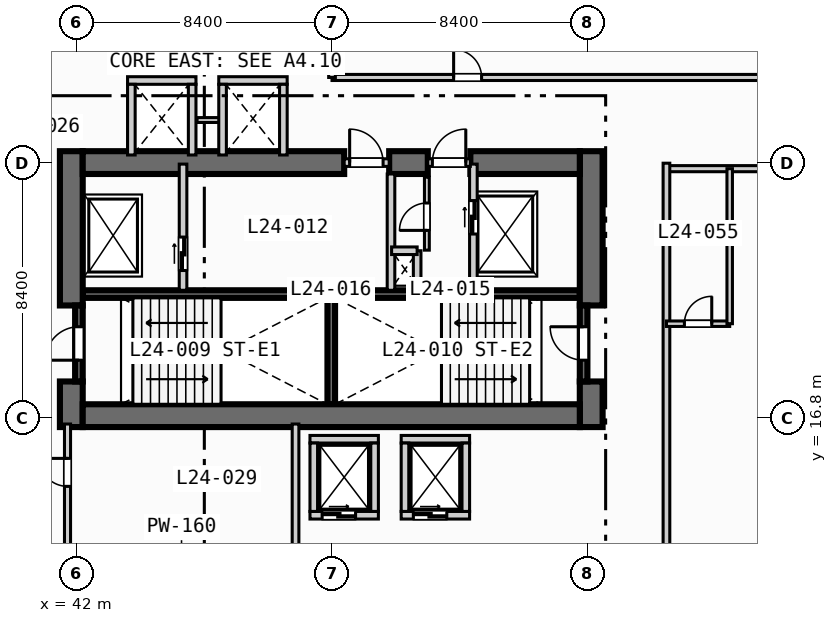
"""IFC4 building model, lengths in metres.
Left out: names, types, materials, properties, quantities, classifications, styles, units other than length and angle.
Written with IfcOpenShell. Run it as: python <this file> out.ifc"""

import sys

from ifc_helpers import new_model, si_unit, direction, frame, frame_2d, origin, place, context, subcontext, project, spatial, rectangle, extrude, element, fill, save


model = new_model("IFC4")
c1 = context("Model", 3, precision=1e-05, world=origin(), true_north=direction((0.0, 1.0)))
c2 = subcontext(c1, "Body", "Model", "MODEL_VIEW")
j1 = project(units=[si_unit("LENGTHUNIT", "METRE"), si_unit("PLANEANGLEUNIT", "RADIAN")], contexts=[c1])
p1 = place(None, origin())
s1 = spatial("IfcSite", under=j1, at=p1, CompositionType="ELEMENT")
p2 = place(p1, origin())
s2 = spatial("IfcBuilding", under=s1, at=p2, CompositionType="ELEMENT")
p3 = place(p2, frame((0.0, 0.0, 103.8)))
s3 = spatial("IfcBuildingStorey", under=s2, at=p3, CompositionType="ELEMENT", Elevation=103.8)
for number, where, z_axis, x_axis in (
    (1, (42.2, 20.875, 0.0), (0.0, 0.0, 1.0), (1.0, 0.0, 0.0)),
    (2, (50.5, 20.875, 0.0), (0.0, 0.0, 1.0), (1.0, 0.0, 0.0)),
):
    element("IfcWall", number, at=place(p3, frame(where, z_axis=z_axis, x_axis=x_axis)), inside=s3, PredefinedType="SOLIDWALL", context=c2, shape_type="SweptSolid", body=[
        extrude(rectangle(XDim=8.05, YDim=0.25, at=frame_2d((4.025, 0.0))), origin(), (0.0, 0.0, 1.0), 3.55),
    ])
p4 = place(p3, frame((50.375, 17.25, 0.0), z_axis=(0.0, 0.0, 1.0), x_axis=(0.0, 1.0, 0.0)))
e3 = element("IfcWall", 3, at=p4, inside=s3, PredefinedType="SOLIDWALL", context=c2, shape_type="SweptSolid", body=[
    extrude(rectangle(XDim=3.5, YDim=0.25, at=frame_2d((1.75, 0.0))), origin(), (0.0, 0.0, 1.0), 3.55),
])
p5 = place(p3, frame((41.825, 16.5, 0.0), z_axis=(0.0, 0.0, 1.0), x_axis=(0.0, 1.0, 0.0)))
e4 = element("IfcWall", 4, at=p5, inside=s3, PredefinedType="SHEAR", context=c2, shape_type="SweptSolid", body=[
    extrude(rectangle(XDim=1.5, YDim=0.75, at=frame_2d((0.75, 0.0))), origin(), (0.0, 0.0, 1.0), 3.55),
])
p6 = place(p3, frame((41.825, 20.5, 0.0), z_axis=(0.0, 0.0, 1.0), x_axis=(0.0, 1.0, 0.0)))
e5 = element("IfcWall", 5, at=p6, inside=s3, PredefinedType="SHEAR", context=c2, shape_type="SweptSolid", body=[
    extrude(rectangle(XDim=5.075, YDim=0.75, at=frame_2d((2.538, 0.0))), origin(), (0.0, 0.0, 1.0), 3.55),
])
p7 = place(p3, frame((58.925, 16.5, 0.0), z_axis=(0.0, 0.0, 1.0), x_axis=(0.0, 1.0, 0.0)))
e6 = element("IfcWall", 6, at=p7, inside=s3, PredefinedType="SHEAR", context=c2, shape_type="SweptSolid", body=[
    extrude(rectangle(XDim=1.5, YDim=0.75, at=frame_2d((0.75, 0.0))), origin(), (0.0, 0.0, 1.0), 3.55),
])
p8 = place(p3, frame((58.925, 20.5, 0.0), z_axis=(0.0, 0.0, 1.0), x_axis=(0.0, 1.0, 0.0)))
e7 = element("IfcWall", 7, at=p8, inside=s3, PredefinedType="SHEAR", context=c2, shape_type="SweptSolid", body=[
    extrude(rectangle(XDim=5.075, YDim=0.75, at=frame_2d((2.538, 0.0))), origin(), (0.0, 0.0, 1.0), 3.55),
])
p9 = place(p3, frame((42.2, 16.875, 0.0), z_axis=(0.0, 0.0, 1.0), x_axis=(1.0, 0.0, 0.0)))
e8 = element("IfcWall", 8, at=p9, inside=s3, PredefinedType="SHEAR", context=c2, shape_type="SweptSolid", body=[
    extrude(rectangle(XDim=16.35, YDim=0.75, at=frame_2d((8.175, 0.0))), origin(), (0.0, 0.0, 1.0), 3.55),
])
p10 = place(p3, frame((42.2, 25.2, 0.0), z_axis=(0.0, 0.0, 1.0), x_axis=(1.0, 0.0, 0.0)))
e9 = element("IfcWall", 9, at=p10, inside=s3, PredefinedType="SHEAR", context=c2, shape_type="SweptSolid", body=[
    extrude(rectangle(XDim=8.6, YDim=0.75, at=frame_2d((4.3, 0.0))), origin(), (0.0, 0.0, 1.0), 3.55),
])
p11 = place(p3, frame((52.28, 25.2, 0.0), z_axis=(0.0, 0.0, 1.0), x_axis=(1.0, 0.0, 0.0)))
e10 = element("IfcWall", 10, at=p11, inside=s3, PredefinedType="SHEAR", context=c2, shape_type="SweptSolid", body=[
    extrude(rectangle(XDim=1.27, YDim=0.75, at=frame_2d((0.635, 0.0))), origin(), (0.0, 0.0, 1.0), 3.55),
])
p12 = place(p3, frame((54.95, 25.2, 0.0), z_axis=(0.0, 0.0, 1.0), x_axis=(1.0, 0.0, 0.0)))
e11 = element("IfcWall", 11, at=p12, inside=s3, PredefinedType="SHEAR", context=c2, shape_type="SweptSolid", body=[
    extrude(rectangle(XDim=3.6, YDim=0.75, at=frame_2d((1.8, 0.0))), origin(), (0.0, 0.0, 1.0), 3.55),
])
p13 = place(p3, frame((42.075, 18.0, 0.0), z_axis=(0.0, 0.0, 1.0), x_axis=(0.0, 1.0, 0.0)))
e12 = element("IfcWall", 12, at=p13, inside=s3, PredefinedType="SOLIDWALL", context=c2, shape_type="SweptSolid", body=[
    extrude(rectangle(XDim=2.5, YDim=0.25, at=frame_2d((1.25, 0.0))), origin(), (0.0, 0.0, 1.0), 3.55),
])
p14 = place(p13, frame((0.7, 0.0, 0.0)))
e13 = element("IfcOpeningElement", 13, at=p14, cuts=e12, PredefinedType="OPENING", context=c2, shape_type="SweptSolid", body=[
    extrude(rectangle(XDim=1.1, YDim=2.15, at=frame_2d((0.55, 1.075))), frame((0.0, 0.135, 0.0), z_axis=(0.0, -1.0, 0.0), x_axis=(1.0, 0.0, 0.0)), (0.0, 0.0, 1.0), 0.27),
])
p15 = place(p3, frame((58.675, 18.0, 0.0), z_axis=(0.0, 0.0, 1.0), x_axis=(0.0, 1.0, 0.0)))
e14 = element("IfcWall", 14, at=p15, inside=s3, PredefinedType="SOLIDWALL", context=c2, shape_type="SweptSolid", body=[
    extrude(rectangle(XDim=2.5, YDim=0.25, at=frame_2d((1.25, 0.0))), origin(), (0.0, 0.0, 1.0), 3.55),
])
p16 = place(p15, frame((0.7, 0.0, 0.0)))
e15 = element("IfcOpeningElement", 15, at=p16, cuts=e14, PredefinedType="OPENING", context=c2, shape_type="SweptSolid", body=[
    extrude(rectangle(XDim=1.1, YDim=2.15, at=frame_2d((0.55, 1.075))), frame((0.0, 0.135, 0.0), z_axis=(0.0, -1.0, 0.0), x_axis=(1.0, 0.0, 0.0)), (0.0, 0.0, 1.0), 0.27),
])
p17 = place(p3, frame((45.5, 21.0, 0.0), z_axis=(0.0, 0.0, 1.0), x_axis=(0.0, 1.0, 0.0)))
e16 = element("IfcWall", 16, at=p17, inside=s3, PredefinedType="SOLIDWALL", context=c2, shape_type="SweptSolid", body=[
    extrude(rectangle(XDim=4.15, YDim=0.25, at=frame_2d((2.075, 0.0))), origin(), (0.0, 0.0, 1.0), 3.55),
])
p18 = place(p17, frame((0.65, 0.0, 0.0)))
e17 = element("IfcOpeningElement", 17, at=p18, cuts=e16, PredefinedType="OPENING", context=c2, shape_type="SweptSolid", body=[
    extrude(rectangle(XDim=1.1, YDim=2.15, at=frame_2d((0.55, 1.075))), frame((0.0, 0.135, 0.0), z_axis=(0.0, -1.0, 0.0), x_axis=(1.0, 0.0, 0.0)), (0.0, 0.0, 1.0), 0.27),
])
p19 = place(p3, frame((50.8, 25.2, 0.0), z_axis=(0.0, 0.0, 1.0), x_axis=(1.0, 0.0, 0.0)))
e18 = element("IfcWall", 18, at=p19, inside=s3, PredefinedType="SOLIDWALL", context=c2, shape_type="SweptSolid", body=[
    extrude(rectangle(XDim=1.48, YDim=0.25, at=frame_2d((0.74, 0.0))), origin(), (0.0, 0.0, 1.0), 3.55),
])
p20 = place(p19, frame((0.18, 0.0, 0.0)))
e19 = element("IfcOpeningElement", 19, at=p20, cuts=e18, PredefinedType="OPENING", context=c2, shape_type="SweptSolid", body=[
    extrude(rectangle(XDim=1.1, YDim=2.15, at=frame_2d((0.55, 1.075))), frame((0.0, 0.135, 0.0), z_axis=(0.0, -1.0, 0.0), x_axis=(1.0, 0.0, 0.0)), (0.0, 0.0, 1.0), 0.27),
])
p21 = place(p3, frame((52.34, 21.0, 0.0), z_axis=(0.0, 0.0, 1.0), x_axis=(0.0, 1.0, 0.0)))
e20 = element("IfcWall", 20, at=p21, inside=s3, PredefinedType="SOLIDWALL", context=c2, shape_type="SweptSolid", body=[
    extrude(rectangle(XDim=3.825, YDim=0.25, at=frame_2d((1.913, 0.0))), origin(), (0.0, 0.0, 1.0), 3.55),
])
p22 = place(p3, frame((55.05, 21.0, 0.0), z_axis=(0.0, 0.0, 1.0), x_axis=(0.0, 1.0, 0.0)))
e21 = element("IfcWall", 21, at=p22, inside=s3, PredefinedType="SOLIDWALL", context=c2, shape_type="SweptSolid", body=[
    extrude(rectangle(XDim=4.15, YDim=0.25, at=frame_2d((2.075, 0.0))), origin(), (0.0, 0.0, 1.0), 3.55),
])
p23 = place(p22, frame((1.85, 0.0, 0.0)))
e22 = element("IfcOpeningElement", 22, at=p23, cuts=e21, PredefinedType="OPENING", context=c2, shape_type="SweptSolid", body=[
    extrude(rectangle(XDim=1.1, YDim=2.15, at=frame_2d((0.55, 1.075))), frame((0.0, 0.135, 0.0), z_axis=(0.0, -1.0, 0.0), x_axis=(1.0, 0.0, 0.0)), (0.0, 0.0, 1.0), 0.27),
])
p24 = place(p3, frame((53.55, 25.2, 0.0), z_axis=(0.0, 0.0, 1.0), x_axis=(1.0, 0.0, 0.0)))
e23 = element("IfcWall", 23, at=p24, inside=s3, PredefinedType="SOLIDWALL", context=c2, shape_type="SweptSolid", body=[
    extrude(rectangle(XDim=1.4, YDim=0.25, at=frame_2d((0.7, 0.0))), origin(), (0.0, 0.0, 1.0), 3.55),
])
p25 = place(p24, frame((0.15, 0.0, 0.0)))
e24 = element("IfcOpeningElement", 24, at=p25, cuts=e23, PredefinedType="OPENING", context=c2, shape_type="SweptSolid", body=[
    extrude(rectangle(XDim=1.1, YDim=2.15, at=frame_2d((0.55, 1.075))), frame((0.0, 0.135, 0.0), z_axis=(0.0, -1.0, 0.0), x_axis=(1.0, 0.0, 0.0)), (0.0, 0.0, 1.0), 0.27),
])
p26 = place(p3, frame((53.2, 21.0, 0.0), z_axis=(0.0, 0.0, 1.0), x_axis=(0.0, 1.0, 0.0)))
e25 = element("IfcWall", 25, at=p26, inside=s3, PredefinedType="SOLIDWALL", context=c2, shape_type="SweptSolid", body=[
    extrude(rectangle(XDim=1.3, YDim=0.25, at=frame_2d((0.65, 0.0))), origin(), (0.0, 0.0, 1.0), 3.55),
])
p27 = place(p3, frame((52.36, 22.3, 0.0), z_axis=(0.0, 0.0, 1.0), x_axis=(1.0, 0.0, 0.0)))
e26 = element("IfcWall", 26, at=p27, inside=s3, PredefinedType="SOLIDWALL", context=c2, shape_type="SweptSolid", body=[
    extrude(rectangle(XDim=0.84, YDim=0.25, at=frame_2d((0.42, 0.0))), origin(), (0.0, 0.0, 1.0), 3.55),
])
p28 = place(p3, frame((53.52, 22.32, 0.0), z_axis=(0.0, 0.0, 1.0), x_axis=(0.0, 1.0, 0.0)))
e27 = element("IfcWall", 27, at=p28, inside=s3, PredefinedType="PARTITIONING", context=c2, shape_type="SweptSolid", body=[
    extrude(rectangle(XDim=2.4, YDim=0.16, at=frame_2d((1.2, 0.0))), origin(), (0.0, 0.0, 1.0), 3.55),
])
p29 = place(p28, frame((0.65, 0.0, 0.0)))
e28 = element("IfcOpeningElement", 28, at=p29, cuts=e27, PredefinedType="OPENING", context=c2, shape_type="SweptSolid", body=[
    extrude(rectangle(XDim=0.9, YDim=2.1, at=frame_2d((0.45, 1.05))), frame((0.0, 0.09, 0.0), z_axis=(0.0, -1.0, 0.0), x_axis=(1.0, 0.0, 0.0)), (0.0, 0.0, 1.0), 0.18),
])
p30 = place(p3, frame((49.675, 13.6, 0.0), z_axis=(0.0, 0.0, 1.0), x_axis=(1.0, 0.0, 0.0)))
e29 = element("IfcWall", 29, at=p30, inside=s3, PredefinedType="SOLIDWALL", context=c2, shape_type="SweptSolid", body=[
    extrude(rectangle(XDim=2.25, YDim=0.25, at=frame_2d((1.125, 0.0))), origin(), (0.0, 0.0, 1.0), 3.55),
])
p31 = place(p30, frame((0.4, 0.0, 0.0)))
e30 = element("IfcOpeningElement", 30, at=p31, cuts=e29, PredefinedType="OPENING", context=c2, shape_type="SweptSolid", body=[
    extrude(rectangle(XDim=1.1, YDim=2.15, at=frame_2d((0.55, 1.075))), frame((0.0, 0.135, 0.0), z_axis=(0.0, -1.0, 0.0), x_axis=(1.0, 0.0, 0.0)), (0.0, 0.0, 1.0), 0.27),
])
for number, where, z_axis, x_axis in (
    (31, (49.675, 16.1, 0.0), (0.0, 0.0, 1.0), (1.0, 0.0, 0.0)),
    (32, (49.8, 13.725, 0.0), (0.0, 0.0, 1.0), (0.0, 1.0, 0.0)),
    (33, (51.8, 13.725, 0.0), (0.0, 0.0, 1.0), (0.0, 1.0, 0.0)),
):
    element("IfcWall", number, at=place(p3, frame(where, z_axis=z_axis, x_axis=x_axis)), inside=s3, PredefinedType="SOLIDWALL", context=c2, shape_type="SweptSolid", body=[
        extrude(rectangle(XDim=2.25, YDim=0.25, at=frame_2d((1.125, 0.0))), origin(), (0.0, 0.0, 1.0), 3.55),
    ])
p32 = place(p3, frame((52.675, 13.6, 0.0), z_axis=(0.0, 0.0, 1.0), x_axis=(1.0, 0.0, 0.0)))
e34 = element("IfcWall", 34, at=p32, inside=s3, PredefinedType="SOLIDWALL", context=c2, shape_type="SweptSolid", body=[
    extrude(rectangle(XDim=2.25, YDim=0.25, at=frame_2d((1.125, 0.0))), origin(), (0.0, 0.0, 1.0), 3.55),
])
p33 = place(p32, frame((0.4, 0.0, 0.0)))
e35 = element("IfcOpeningElement", 35, at=p33, cuts=e34, PredefinedType="OPENING", context=c2, shape_type="SweptSolid", body=[
    extrude(rectangle(XDim=1.1, YDim=2.15, at=frame_2d((0.55, 1.075))), frame((0.0, 0.135, 0.0), z_axis=(0.0, -1.0, 0.0), x_axis=(1.0, 0.0, 0.0)), (0.0, 0.0, 1.0), 0.27),
])
for number, where, z_axis, x_axis in (
    (36, (52.675, 16.1, 0.0), (0.0, 0.0, 1.0), (1.0, 0.0, 0.0)),
    (37, (52.8, 13.725, 0.0), (0.0, 0.0, 1.0), (0.0, 1.0, 0.0)),
    (38, (54.8, 13.725, 0.0), (0.0, 0.0, 1.0), (0.0, 1.0, 0.0)),
    (39, (43.675, 27.9, 0.0), (0.0, 0.0, 1.0), (1.0, 0.0, 0.0)),
):
    element("IfcWall", number, at=place(p3, frame(where, z_axis=z_axis, x_axis=x_axis)), inside=s3, PredefinedType="SOLIDWALL", context=c2, shape_type="SweptSolid", body=[
        extrude(rectangle(XDim=2.25, YDim=0.25, at=frame_2d((1.125, 0.0))), origin(), (0.0, 0.0, 1.0), 3.55),
    ])
for number, where, z_axis, x_axis in (
    (40, (43.8, 25.45, 0.0), (0.0, 0.0, 1.0), (0.0, 1.0, 0.0)),
    (41, (45.8, 25.45, 0.0), (0.0, 0.0, 1.0), (0.0, 1.0, 0.0)),
):
    element("IfcWall", number, at=place(p3, frame(where, z_axis=z_axis, x_axis=x_axis)), inside=s3, PredefinedType="SOLIDWALL", context=c2, shape_type="SweptSolid", body=[
        extrude(rectangle(XDim=2.325, YDim=0.25, at=frame_2d((1.163, 0.0))), origin(), (0.0, 0.0, 1.0), 3.55),
    ])
p34 = place(p3, frame((45.96, 26.6, 0.0), z_axis=(0.0, 0.0, 1.0), x_axis=(1.0, 0.0, 0.0)))
e42 = element("IfcWall", 42, at=p34, inside=s3, PredefinedType="PARTITIONING", context=c2, shape_type="SweptSolid", body=[
    extrude(rectangle(XDim=0.88, YDim=0.16, at=frame_2d((0.44, 0.0))), origin(), (0.0, 0.0, 1.0), 3.55),
])
p35 = place(p3, frame((46.675, 27.9, 0.0), z_axis=(0.0, 0.0, 1.0), x_axis=(1.0, 0.0, 0.0)))
e43 = element("IfcWall", 43, at=p35, inside=s3, PredefinedType="SOLIDWALL", context=c2, shape_type="SweptSolid", body=[
    extrude(rectangle(XDim=2.25, YDim=0.25, at=frame_2d((1.125, 0.0))), origin(), (0.0, 0.0, 1.0), 3.55),
])
for number, where, z_axis, x_axis in (
    (44, (46.8, 25.45, 0.0), (0.0, 0.0, 1.0), (0.0, 1.0, 0.0)),
    (45, (48.8, 25.45, 0.0), (0.0, 0.0, 1.0), (0.0, 1.0, 0.0)),
):
    element("IfcWall", number, at=place(p3, frame(where, z_axis=z_axis, x_axis=x_axis)), inside=s3, PredefinedType="SOLIDWALL", context=c2, shape_type="SweptSolid", body=[
        extrude(rectangle(XDim=2.325, YDim=0.25, at=frame_2d((1.163, 0.0))), origin(), (0.0, 0.0, 1.0), 3.55),
    ])
p36 = place(p3, frame((41.7, 0.35, 0.0), z_axis=(0.0, 0.0, 1.0), x_axis=(0.0, 1.0, 0.0)))
e46 = element("IfcWall", 46, at=p36, inside=s3, PredefinedType="PARTITIONING", context=c2, shape_type="SweptSolid", body=[
    extrude(rectangle(XDim=16.25, YDim=0.2, at=frame_2d((8.125, 0.0))), origin(), (0.0, 0.0, 1.0), 2.8),
])
p37 = place(p36, frame((14.2, 0.0, 0.0)))
e47 = element("IfcOpeningElement", 47, at=p37, cuts=e46, PredefinedType="OPENING", context=c2, shape_type="SweptSolid", body=[
    extrude(rectangle(XDim=0.92, YDim=2.1, at=frame_2d((0.46, 1.05))), frame((0.0, 0.11, 0.0), z_axis=(0.0, -1.0, 0.0), x_axis=(1.0, 0.0, 0.0)), (0.0, 0.0, 1.0), 0.22),
])
p38 = place(p3, frame((49.2, 0.35, 0.0), z_axis=(0.0, 0.0, 1.0), x_axis=(0.0, 1.0, 0.0)))
e48 = element("IfcWall", 48, at=p38, inside=s3, PredefinedType="PARTITIONING", context=c2, shape_type="SweptSolid", body=[
    extrude(rectangle(XDim=16.25, YDim=0.22, at=frame_2d((8.125, 0.0))), origin(), (0.0, 0.0, 1.0), 3.55),
])
p39 = place(p3, frame((61.4, 25.0, 0.0), z_axis=(0.0, 0.0, 1.0), x_axis=(1.0, 0.0, 0.0)))
e49 = element("IfcWall", 49, at=p39, inside=s3, PredefinedType="PARTITIONING", context=c2, shape_type="SweptSolid", body=[
    extrude(rectangle(XDim=10.8, YDim=0.2, at=frame_2d((5.4, 0.0))), origin(), (0.0, 0.0, 1.0), 2.8),
])
p40 = place(p39, frame((3.18, 0.0, 0.0)))
e50 = element("IfcOpeningElement", 50, at=p40, cuts=e49, PredefinedType="OPENING", context=c2, shape_type="SweptSolid", body=[
    extrude(rectangle(XDim=1.0, YDim=2.15, at=frame_2d((0.5, 1.075))), frame((0.0, 0.11, 0.0), z_axis=(0.0, -1.0, 0.0), x_axis=(1.0, 0.0, 0.0)), (0.0, 0.0, 1.0), 0.22),
])
p41 = place(p39, frame((6.84, 0.0, 0.0)))
e51 = element("IfcOpeningElement", 51, at=p41, cuts=e49, PredefinedType="OPENING", context=c2, shape_type="SweptSolid", body=[
    extrude(rectangle(XDim=1.0, YDim=2.15, at=frame_2d((0.5, 1.075))), frame((0.0, 0.11, 0.0), z_axis=(0.0, -1.0, 0.0), x_axis=(1.0, 0.0, 0.0)), (0.0, 0.0, 1.0), 0.22),
])
p42 = place(p3, frame((61.4, 0.2, 0.0), z_axis=(0.0, 0.0, 1.0), x_axis=(0.0, 1.0, 0.0)))
e52 = element("IfcWall", 52, at=p42, inside=s3, PredefinedType="PARTITIONING", context=c2, shape_type="SweptSolid", body=[
    extrude(rectangle(XDim=24.98, YDim=0.22, at=frame_2d((12.49, 0.0))), origin(), (0.0, 0.0, 1.0), 3.55),
])
p43 = place(p3, frame((61.4, 19.9, 0.0), z_axis=(0.0, 0.0, 1.0), x_axis=(1.0, 0.0, 0.0)))
e53 = element("IfcWall", 53, at=p43, inside=s3, PredefinedType="PLUMBINGWALL", context=c2, shape_type="SweptSolid", body=[
    extrude(rectangle(XDim=2.08, YDim=0.18, at=frame_2d((1.04, 0.0))), origin(), (0.0, 0.0, 1.0), 3.55),
])
p44 = place(p43, frame((0.59, 0.0, 0.0)))
e54 = element("IfcOpeningElement", 54, at=p44, cuts=e53, PredefinedType="OPENING", context=c2, shape_type="SweptSolid", body=[
    extrude(rectangle(XDim=0.9, YDim=2.1, at=frame_2d((0.45, 1.05))), frame((0.0, 0.1, 0.0), z_axis=(0.0, -1.0, 0.0), x_axis=(1.0, 0.0, 0.0)), (0.0, 0.0, 1.0), 0.2),
])
p45 = place(p3, frame((63.48, 19.9, 0.0), z_axis=(0.0, 0.0, 1.0), x_axis=(0.0, 1.0, 0.0)))
e55 = element("IfcWall", 55, at=p45, inside=s3, PredefinedType="PLUMBINGWALL", context=c2, shape_type="SweptSolid", body=[
    extrude(rectangle(XDim=5.1, YDim=0.18, at=frame_2d((2.55, 0.0))), origin(), (0.0, 0.0, 1.0), 3.55),
])
p46 = place(p3, frame((50.4, 28.0, 0.0), z_axis=(0.0, 0.0, 1.0), x_axis=(1.0, 0.0, 0.0)))
e56 = element("IfcWall", 56, at=p46, inside=s3, PredefinedType="PARTITIONING", context=c2, shape_type="SweptSolid", body=[
    extrude(rectangle(XDim=21.8, YDim=0.2, at=frame_2d((10.9, 0.0))), origin(), (0.0, 0.0, 1.0), 3.55),
])
p47 = place(p46, frame((4.0, 0.0, 0.0)))
e57 = element("IfcOpeningElement", 57, at=p47, cuts=e56, PredefinedType="OPENING", context=c2, shape_type="SweptSolid", body=[
    extrude(rectangle(XDim=0.92, YDim=2.1, at=frame_2d((0.46, 1.05))), frame((0.0, 0.11, 0.0), z_axis=(0.0, -1.0, 0.0), x_axis=(1.0, 0.0, 0.0)), (0.0, 0.0, 1.0), 0.22),
])
p48 = place(p3, frame((50.4, 28.0, 0.0), z_axis=(0.0, 0.0, 1.0), x_axis=(0.0, 1.0, 0.0)))
e58 = element("IfcWall", 58, at=p48, inside=s3, PredefinedType="PARTITIONING", context=c2, shape_type="SweptSolid", body=[
    extrude(rectangle(XDim=5.3, YDim=0.22, at=frame_2d((2.65, 0.0))), origin(), (0.0, 0.0, 1.0), 2.8),
])
p49 = place(p14, origin())
e59 = element("IfcDoor", 59, at=p49, inside=s3, OperationType="SINGLE_SWING_LEFT", PredefinedType="DOOR", context=c2, shape_type="SweptSolid", body=[
    extrude(rectangle(XDim=1.1, YDim=2.15, at=frame_2d((0.55, 1.075))), frame((0.0, 0.025, 0.0), z_axis=(0.0, -1.0, 0.0), x_axis=(1.0, 0.0, 0.0)), (0.0, 0.0, 1.0), 0.05),
])
fill(e13, e59)
p50 = place(p16, origin())
e60 = element("IfcDoor", 60, at=p50, inside=s3, OperationType="SINGLE_SWING_RIGHT", PredefinedType="DOOR", context=c2, shape_type="SweptSolid", body=[
    extrude(rectangle(XDim=1.1, YDim=2.15, at=frame_2d((0.55, 1.075))), frame((0.0, 0.025, 0.0), z_axis=(0.0, -1.0, 0.0), x_axis=(1.0, 0.0, 0.0)), (0.0, 0.0, 1.0), 0.05),
])
fill(e15, e60)
p51 = place(p18, origin())
e61 = element("IfcDoor", 61, at=p51, inside=s3, OperationType="SLIDING_TO_LEFT", PredefinedType="DOOR", context=c2, shape_type="SweptSolid", body=[
    extrude(rectangle(XDim=1.1, YDim=2.15, at=frame_2d((0.55, 1.075))), frame((0.0, 0.025, 0.0), z_axis=(0.0, -1.0, 0.0), x_axis=(1.0, 0.0, 0.0)), (0.0, 0.0, 1.0), 0.05),
])
fill(e17, e61)
p52 = place(p20, origin())
e62 = element("IfcDoor", 62, at=p52, inside=s3, OperationType="SINGLE_SWING_LEFT", PredefinedType="DOOR", context=c2, shape_type="SweptSolid", body=[
    extrude(rectangle(XDim=1.1, YDim=2.15, at=frame_2d((0.55, 1.075))), frame((0.0, 0.025, 0.0), z_axis=(0.0, -1.0, 0.0), x_axis=(1.0, 0.0, 0.0)), (0.0, 0.0, 1.0), 0.05),
])
fill(e19, e62)
p53 = place(p23, origin())
e63 = element("IfcDoor", 63, at=p53, inside=s3, OperationType="SLIDING_TO_LEFT", PredefinedType="DOOR", context=c2, shape_type="SweptSolid", body=[
    extrude(rectangle(XDim=1.1, YDim=2.15, at=frame_2d((0.55, 1.075))), frame((0.0, 0.025, 0.0), z_axis=(0.0, -1.0, 0.0), x_axis=(1.0, 0.0, 0.0)), (0.0, 0.0, 1.0), 0.05),
])
fill(e22, e63)
p54 = place(p25, origin())
e64 = element("IfcDoor", 64, at=p54, inside=s3, OperationType="SINGLE_SWING_RIGHT", PredefinedType="DOOR", context=c2, shape_type="SweptSolid", body=[
    extrude(rectangle(XDim=1.1, YDim=2.15, at=frame_2d((0.55, 1.075))), frame((0.0, 0.025, 0.0), z_axis=(0.0, -1.0, 0.0), x_axis=(1.0, 0.0, 0.0)), (0.0, 0.0, 1.0), 0.05),
])
fill(e24, e64)
p55 = place(p29, origin())
e65 = element("IfcDoor", 65, at=p55, inside=s3, OperationType="SINGLE_SWING_LEFT", PredefinedType="DOOR", context=c2, shape_type="SweptSolid", body=[
    extrude(rectangle(XDim=0.9, YDim=2.1, at=frame_2d((0.45, 1.05))), frame((0.0, 0.025, 0.0), z_axis=(0.0, -1.0, 0.0), x_axis=(1.0, 0.0, 0.0)), (0.0, 0.0, 1.0), 0.05),
])
fill(e28, e65)
p56 = place(p31, origin())
e66 = element("IfcDoor", 66, at=p56, inside=s3, OperationType="SLIDING_TO_LEFT", PredefinedType="DOOR", context=c2, shape_type="SweptSolid", body=[
    extrude(rectangle(XDim=1.1, YDim=2.15, at=frame_2d((0.55, 1.075))), frame((0.0, 0.025, 0.0), z_axis=(0.0, -1.0, 0.0), x_axis=(1.0, 0.0, 0.0)), (0.0, 0.0, 1.0), 0.05),
])
fill(e30, e66)
p57 = place(p33, origin())
e67 = element("IfcDoor", 67, at=p57, inside=s3, OperationType="SLIDING_TO_LEFT", PredefinedType="DOOR", context=c2, shape_type="SweptSolid", body=[
    extrude(rectangle(XDim=1.1, YDim=2.15, at=frame_2d((0.55, 1.075))), frame((0.0, 0.025, 0.0), z_axis=(0.0, -1.0, 0.0), x_axis=(1.0, 0.0, 0.0)), (0.0, 0.0, 1.0), 0.05),
])
fill(e35, e67)
p58 = place(p37, origin())
e68 = element("IfcDoor", 68, at=p58, inside=s3, OperationType="SINGLE_SWING_RIGHT", PredefinedType="DOOR", context=c2, shape_type="SweptSolid", body=[
    extrude(rectangle(XDim=0.92, YDim=2.1, at=frame_2d((0.46, 1.05))), frame((0.0, 0.025, 0.0), z_axis=(0.0, -1.0, 0.0), x_axis=(1.0, 0.0, 0.0)), (0.0, 0.0, 1.0), 0.05),
])
fill(e47, e68)
p59 = place(p44, origin())
e69 = element("IfcDoor", 69, at=p59, inside=s3, OperationType="SINGLE_SWING_RIGHT", PredefinedType="DOOR", context=c2, shape_type="SweptSolid", body=[
    extrude(rectangle(XDim=0.9, YDim=2.1, at=frame_2d((0.45, 1.05))), frame((0.0, 0.025, 0.0), z_axis=(0.0, -1.0, 0.0), x_axis=(1.0, 0.0, 0.0)), (0.0, 0.0, 1.0), 0.05),
])
fill(e54, e69)
p60 = place(p47, origin())
e70 = element("IfcDoor", 70, at=p60, inside=s3, OperationType="SINGLE_SWING_LEFT", PredefinedType="DOOR", context=c2, shape_type="SweptSolid", body=[
    extrude(rectangle(XDim=0.92, YDim=2.1, at=frame_2d((0.46, 1.05))), frame((0.0, 0.025, 0.0), z_axis=(0.0, -1.0, 0.0), x_axis=(1.0, 0.0, 0.0)), (0.0, 0.0, 1.0), 0.05),
])
fill(e57, e70)
save(model, sys.argv[1])
